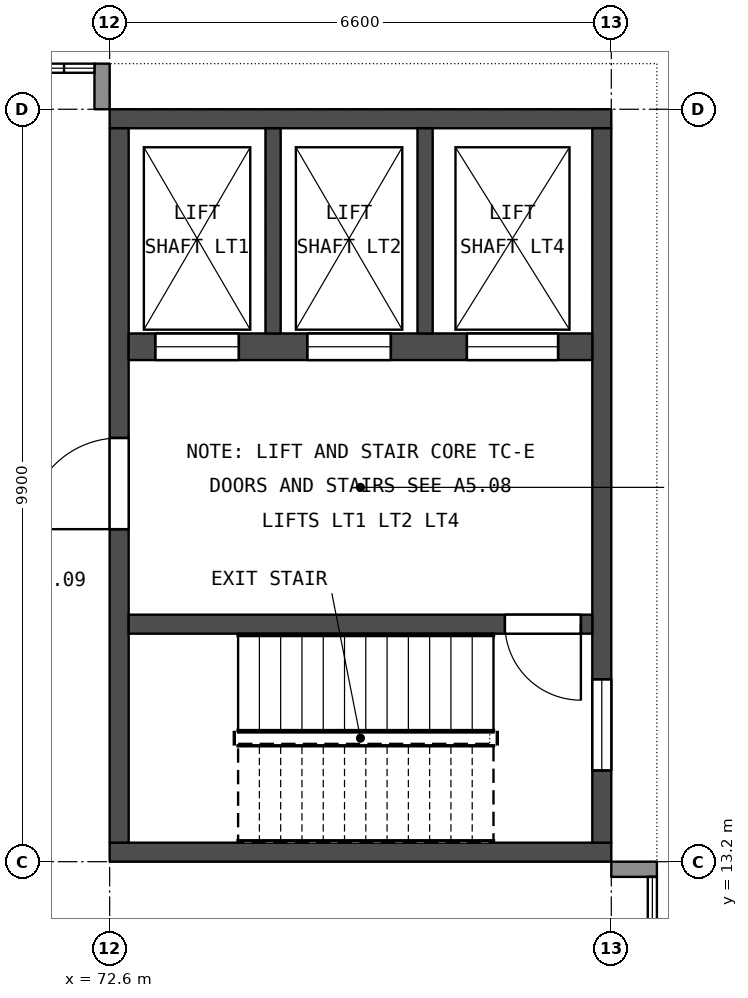
"""IFC4 building model, lengths in metres.
Left out: names, types, materials, properties, quantities, classifications, styles, units other than length and angle.
Written with IfcOpenShell. Run it as: python <this file> out.ifc"""

import sys

from ifc_helpers import new_model, si_unit, direction, frame, frame_2d, origin, place, context, subcontext, project, spatial, rectangle, extrude, element, fill, save


model = new_model("IFC4")
c1 = context("Model", 3, precision=1e-05, world=origin(), true_north=direction((0.0, 1.0)))
c2 = subcontext(c1, "Body", "Model", "MODEL_VIEW")
j1 = project(units=[si_unit("LENGTHUNIT", "METRE"), si_unit("PLANEANGLEUNIT", "RADIAN")], contexts=[c1])
p1 = place(None, origin())
s1 = spatial("IfcSite", under=j1, at=p1, CompositionType="ELEMENT")
p2 = place(p1, origin())
s2 = spatial("IfcBuilding", under=s1, at=p2, CompositionType="ELEMENT")
p3 = place(p2, frame((0.0, 0.0, 36.9)))
s3 = spatial("IfcBuildingStorey", under=s2, at=p3, CompositionType="ELEMENT", Elevation=36.9)
for number, where, z_axis, x_axis in (
    (1, (72.6, 13.325, 0.0), (0.0, 0.0, 1.0), (1.0, 0.0, 0.0)),
    (2, (72.6, 22.975, 0.0), (0.0, 0.0, 1.0), (1.0, 0.0, 0.0)),
):
    element("IfcWall", number, at=place(p3, frame(where, z_axis=z_axis, x_axis=x_axis)), inside=s3, PredefinedType="SHEAR", context=c2, shape_type="SweptSolid", body=[
        extrude(rectangle(XDim=6.6, YDim=0.25, at=frame_2d((3.3, 0.0))), origin(), (0.0, 0.0, 1.0), 4.2),
    ])
p4 = place(p3, frame((72.725, 13.45, 0.0), z_axis=(0.0, 0.0, 1.0), x_axis=(0.0, 1.0, 0.0)))
e3 = element("IfcWall", 3, at=p4, inside=s3, PredefinedType="SHEAR", context=c2, shape_type="SweptSolid", body=[
    extrude(rectangle(XDim=9.4, YDim=0.25, at=frame_2d((4.7, 0.0))), origin(), (0.0, 0.0, 1.0), 4.2),
])
p5 = place(p4, frame((4.125, 0.0, 0.0)))
e4 = element("IfcOpeningElement", 4, at=p5, cuts=e3, PredefinedType="OPENING", context=c2, shape_type="SweptSolid", body=[
    extrude(rectangle(XDim=1.2, YDim=2.1, at=frame_2d((0.6, 1.05))), frame((0.0, 0.135, 0.0), z_axis=(0.0, -1.0, 0.0), x_axis=(1.0, 0.0, 0.0)), (0.0, 0.0, 1.0), 0.27),
])
p6 = place(p3, frame((79.075, 13.45, 0.0), z_axis=(0.0, 0.0, 1.0), x_axis=(0.0, 1.0, 0.0)))
e5 = element("IfcWall", 5, at=p6, inside=s3, PredefinedType="SHEAR", context=c2, shape_type="SweptSolid", body=[
    extrude(rectangle(XDim=9.4, YDim=0.25, at=frame_2d((4.7, 0.0))), origin(), (0.0, 0.0, 1.0), 4.2),
])
p7 = place(p6, frame((0.95, 0.0, 0.7)))
e6 = element("IfcOpeningElement", 6, at=p7, cuts=e5, PredefinedType="OPENING", context=c2, shape_type="SweptSolid", body=[
    extrude(rectangle(XDim=1.2, YDim=1.8, at=frame_2d((0.6, 0.9))), frame((0.0, 0.135, 0.0), z_axis=(0.0, -1.0, 0.0), x_axis=(1.0, 0.0, 0.0)), (0.0, 0.0, 1.0), 0.27),
])
p8 = place(p3, frame((72.85, 16.325, 0.0), z_axis=(0.0, 0.0, 1.0), x_axis=(1.0, 0.0, 0.0)))
e7 = element("IfcWall", 7, at=p8, inside=s3, PredefinedType="SHEAR", context=c2, shape_type="SweptSolid", body=[
    extrude(rectangle(XDim=6.1, YDim=0.25, at=frame_2d((3.05, 0.0))), origin(), (0.0, 0.0, 1.0), 4.2),
])
p9 = place(p8, frame((4.95, 0.0, 0.0)))
e8 = element("IfcOpeningElement", 8, at=p9, cuts=e7, PredefinedType="OPENING", context=c2, shape_type="SweptSolid", body=[
    extrude(rectangle(XDim=1.0, YDim=2.2, at=frame_2d((0.5, 1.1))), frame((0.0, 0.135, 0.0), z_axis=(0.0, -1.0, 0.0), x_axis=(1.0, 0.0, 0.0)), (0.0, 0.0, 1.0), 0.27),
])
p10 = place(p3, frame((72.85, 19.975, 0.0), z_axis=(0.0, 0.0, 1.0), x_axis=(1.0, 0.0, 0.0)))
e9 = element("IfcWall", 9, at=p10, inside=s3, PredefinedType="SHEAR", context=c2, shape_type="SweptSolid", body=[
    extrude(rectangle(XDim=6.1, YDim=0.35, at=frame_2d((3.05, 0.0))), origin(), (0.0, 0.0, 1.0), 4.2),
])
p11 = place(p10, frame((0.35, 0.0, 0.0)))
e10 = element("IfcOpeningElement", 10, at=p11, cuts=e9, PredefinedType="OPENING", context=c2, shape_type="SweptSolid", body=[
    extrude(rectangle(XDim=1.1, YDim=2.2, at=frame_2d((0.55, 1.1))), frame((0.0, 0.185, 0.0), z_axis=(0.0, -1.0, 0.0), x_axis=(1.0, 0.0, 0.0)), (0.0, 0.0, 1.0), 0.37),
])
p12 = place(p10, frame((2.35, 0.0, 0.0)))
e11 = element("IfcOpeningElement", 11, at=p12, cuts=e9, PredefinedType="OPENING", context=c2, shape_type="SweptSolid", body=[
    extrude(rectangle(XDim=1.1, YDim=2.2, at=frame_2d((0.55, 1.1))), frame((0.0, 0.185, 0.0), z_axis=(0.0, -1.0, 0.0), x_axis=(1.0, 0.0, 0.0)), (0.0, 0.0, 1.0), 0.37),
])
p13 = place(p10, frame((4.45, 0.0, 0.0)))
e12 = element("IfcOpeningElement", 12, at=p13, cuts=e9, PredefinedType="OPENING", context=c2, shape_type="SweptSolid", body=[
    extrude(rectangle(XDim=1.2, YDim=2.3, at=frame_2d((0.6, 1.15))), frame((0.0, 0.185, 0.0), z_axis=(0.0, -1.0, 0.0), x_axis=(1.0, 0.0, 0.0)), (0.0, 0.0, 1.0), 0.37),
])
for number, where, z_axis, x_axis in (
    (13, (74.75, 20.15, 0.0), (0.0, 0.0, 1.0), (0.0, 1.0, 0.0)),
    (14, (76.75, 20.15, 0.0), (0.0, 0.0, 1.0), (0.0, 1.0, 0.0)),
):
    element("IfcWall", number, at=place(p3, frame(where, z_axis=z_axis, x_axis=x_axis)), inside=s3, PredefinedType="SHEAR", context=c2, shape_type="SweptSolid", body=[
        extrude(rectangle(XDim=2.7, YDim=0.2, at=frame_2d((1.35, 0.0))), origin(), (0.0, 0.0, 1.0), 4.2),
    ])
p14 = place(p3, frame((79.2, 13.1, 0.0), z_axis=(0.0, 0.0, 1.0), x_axis=(1.0, 0.0, 0.0)))
e15 = element("IfcWall", 15, at=p14, inside=s3, PredefinedType="STANDARD", context=c2, shape_type="SweptSolid", body=[
    extrude(rectangle(XDim=0.6, YDim=0.2, at=frame_2d((0.3, 0.0))), origin(), (0.0, 0.0, 1.0), 3.55),
])
p15 = place(p3, frame((72.5, 23.1, 0.0), z_axis=(0.0, 0.0, 1.0), x_axis=(0.0, 1.0, 0.0)))
e16 = element("IfcWall", 16, at=p15, inside=s3, PredefinedType="STANDARD", context=c2, shape_type="SweptSolid", body=[
    extrude(rectangle(XDim=0.6, YDim=0.2, at=frame_2d((0.3, 0.0))), origin(), (0.0, 0.0, 1.0), 3.55),
])
p16 = place(p5, origin())
e17 = element("IfcDoor", 17, at=p16, inside=s3, OperationType="SINGLE_SWING_LEFT", PredefinedType="DOOR", context=c2, shape_type="SweptSolid", body=[
    extrude(rectangle(XDim=1.2, YDim=2.1, at=frame_2d((0.6, 1.05))), frame((0.0, 0.025, 0.0), z_axis=(0.0, -1.0, 0.0), x_axis=(1.0, 0.0, 0.0)), (0.0, 0.0, 1.0), 0.05),
])
fill(e4, e17)
p17 = place(p9, origin())
e18 = element("IfcDoor", 18, at=p17, inside=s3, OperationType="SINGLE_SWING_RIGHT", PredefinedType="DOOR", context=c2, shape_type="SweptSolid", body=[
    extrude(rectangle(XDim=1.0, YDim=2.2, at=frame_2d((0.5, 1.1))), frame((0.0, 0.025, 0.0), z_axis=(0.0, -1.0, 0.0), x_axis=(1.0, 0.0, 0.0)), (0.0, 0.0, 1.0), 0.05),
])
fill(e8, e18)
p18 = place(p11, origin())
e19 = element("IfcDoor", 19, at=p18, inside=s3, OperationType="DOUBLE_DOOR_SLIDING", PredefinedType="NOTDEFINED", context=c2, shape_type="SweptSolid", body=[
    extrude(rectangle(XDim=1.1, YDim=2.2, at=frame_2d((0.55, 1.1))), frame((0.0, 0.025, 0.0), z_axis=(0.0, -1.0, 0.0), x_axis=(1.0, 0.0, 0.0)), (0.0, 0.0, 1.0), 0.05),
])
fill(e10, e19)
p19 = place(p12, origin())
e20 = element("IfcDoor", 20, at=p19, inside=s3, OperationType="DOUBLE_DOOR_SLIDING", PredefinedType="NOTDEFINED", context=c2, shape_type="SweptSolid", body=[
    extrude(rectangle(XDim=1.1, YDim=2.2, at=frame_2d((0.55, 1.1))), frame((0.0, 0.025, 0.0), z_axis=(0.0, -1.0, 0.0), x_axis=(1.0, 0.0, 0.0)), (0.0, 0.0, 1.0), 0.05),
])
fill(e11, e20)
p20 = place(p13, origin())
e21 = element("IfcDoor", 21, at=p20, inside=s3, OperationType="DOUBLE_DOOR_SLIDING", PredefinedType="NOTDEFINED", context=c2, shape_type="SweptSolid", body=[
    extrude(rectangle(XDim=1.2, YDim=2.3, at=frame_2d((0.6, 1.15))), frame((0.0, 0.025, 0.0), z_axis=(0.0, -1.0, 0.0), x_axis=(1.0, 0.0, 0.0)), (0.0, 0.0, 1.0), 0.05),
])
fill(e12, e21)
p21 = place(p7, origin())
e22 = element("IfcWindow", 22, at=p21, inside=s3, PartitioningType="SINGLE_PANEL", PredefinedType="WINDOW", context=c2, shape_type="SweptSolid", body=[
    extrude(rectangle(XDim=1.2, YDim=1.8, at=frame_2d((0.6, 0.9))), frame((0.0, 0.03, 0.0), z_axis=(0.0, -1.0, 0.0), x_axis=(1.0, 0.0, 0.0)), (0.0, 0.0, 1.0), 0.06),
])
fill(e6, e22)
save(model, sys.argv[1])
